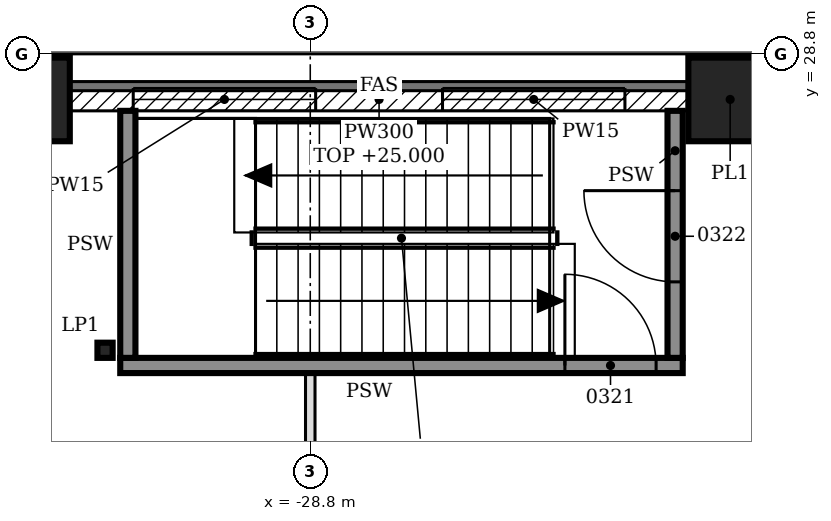
"""IFC4 building model, lengths in metres.
Left out: names, types, materials, properties, quantities, classifications, styles, units other than length and angle.
Written with IfcOpenShell. Run it as: python <this file> out.ifc"""

import sys

from ifc_helpers import new_model, si_unit, direction, frame, frame_2d, origin, origin_2d, place, context, subcontext, project, spatial, polyline, rectangle, hollow_rectangle, i_section, outline, extrude, element, fill, save


model = new_model("IFC4")
c1 = context("Model", 3, precision=1e-05, world=origin(), true_north=direction((0.0, 1.0)))
c2 = subcontext(c1, "Body", "Model", "MODEL_VIEW")
j1 = project(units=[si_unit("LENGTHUNIT", "METRE"), si_unit("PLANEANGLEUNIT", "RADIAN")], contexts=[c1])
p1 = place(None, origin())
s1 = spatial("IfcSite", under=j1, at=p1, CompositionType="ELEMENT")
p2 = place(p1, origin())
s2 = spatial("IfcBuilding", under=s1, at=p2, CompositionType="ELEMENT")
p3 = place(p2, frame((0.0, 0.0, 21.0)))
s3 = spatial("IfcBuildingStorey", under=s2, at=p3, CompositionType="ELEMENT", Elevation=21.0)
for number, where, z_axis, x_axis in (
    (1, (-23.276, 28.2, 0.0), (0.0, 0.0, 1.0), (1.0, 0.0, 0.0)),
    (2, (-32.514, 28.2, 0.0), (0.0, 0.0, 1.0), (1.0, 0.0, 0.0)),
):
    element("IfcColumn", number, at=place(p3, frame(where, z_axis=z_axis, x_axis=x_axis)), inside=s3, PredefinedType="COLUMN", context=c2, shape_type="SweptSolid", body=[
        extrude(hollow_rectangle(XDim=1.1, YDim=1.1, WallThickness=0.06, at=origin_2d()), origin(), (0.0, 0.0, 1.0), 4.8),
    ])
p4 = place(p3, frame((-31.5, 24.9, 0.0), z_axis=(0.0, 0.0, 1.0), x_axis=(1.0, 0.0, 0.0)))
e3 = element("IfcColumn", 3, at=p4, inside=s3, PredefinedType="COLUMN", context=c2, shape_type="SweptSolid", body=[
    extrude(i_section(OverallWidth=0.2, OverallDepth=0.2, WebThickness=0.009, FlangeThickness=0.015, FilletRadius=0.018, at=origin_2d()), origin(), (0.0, 0.0, 1.0), 4.8),
])
p5 = place(p3, frame((-23.826, 28.2, 0.0), z_axis=(0.0, 0.0, 1.0), x_axis=(-1.0, 0.0, 0.0)))
e4 = element("IfcWall", 4, at=p5, inside=s3, PredefinedType="SOLIDWALL", context=c2, shape_type="SweptSolid", body=[
    extrude(rectangle(XDim=8.138, YDim=0.3, at=frame_2d((4.069, 0.0))), origin(), (0.0, 0.0, 1.0), 4.0),
])
p6 = place(p5, frame((0.834, 0.0, 0.9)))
e5 = element("IfcOpeningElement", 5, at=p6, cuts=e4, PredefinedType="OPENING", context=c2, shape_type="SweptSolid", body=[
    extrude(rectangle(XDim=2.4, YDim=1.5, at=frame_2d((1.2, 0.75))), frame((0.0, 0.16, 0.0), z_axis=(0.0, -1.0, 0.0), x_axis=(1.0, 0.0, 0.0)), (0.0, 0.0, 1.0), 0.32),
])
p7 = place(p5, frame((4.903, 0.0, 0.9)))
e6 = element("IfcOpeningElement", 6, at=p7, cuts=e4, PredefinedType="OPENING", context=c2, shape_type="SweptSolid", body=[
    extrude(rectangle(XDim=2.4, YDim=1.5, at=frame_2d((1.2, 0.75))), frame((0.0, 0.16, 0.0), z_axis=(0.0, -1.0, 0.0), x_axis=(1.0, 0.0, 0.0)), (0.0, 0.0, 1.0), 0.32),
])
p8 = place(p3, frame((-28.8, -24.6, 0.0), z_axis=(0.0, 0.0, 1.0), x_axis=(0.0, 1.0, 0.0)))
e7 = element("IfcWall", 7, at=p8, inside=s3, PredefinedType="PARTITIONING", context=c2, shape_type="SweptSolid", body=[
    extrude(outline(polyline([(0.0, 0.0), (49.2, 0.0), (49.2, 4.6), (43.95, 4.6), (43.948, 3.98), (43.65, 3.98), (43.648, 4.6), (39.15, 4.6), (39.148, 3.98), (38.85, 3.98), (38.848, 4.6), (34.35, 4.6), (34.348, 3.98), (34.05, 3.98), (34.048, 4.6), (29.55, 4.6), (29.548, 3.98), (29.25, 3.98), (29.248, 4.6), (24.75, 4.6), (24.748, 3.98), (24.45, 3.98), (24.448, 4.6), (19.95, 4.6), (19.948, 3.98), (19.65, 3.98), (19.648, 4.6), (15.15, 4.6), (15.148, 3.98), (14.85, 3.98), (14.848, 4.6), (10.35, 4.6), (10.348, 3.98), (10.05, 3.98), (10.048, 4.6), (5.55, 4.6), (5.548, 3.98), (5.25, 3.98), (5.248, 4.6), (0.0, 4.6), (0.0, 0.0)])), frame((0.0, 0.062, 0.0), z_axis=(0.0, -1.0, 0.0), x_axis=(1.0, 0.0, 0.0)), (0.0, 0.0, 1.0), 0.125),
])
p9 = place(p8, frame((1.7, 0.0, 0.0)))
e8 = element("IfcOpeningElement", 8, at=p9, cuts=e7, PredefinedType="OPENING", context=c2, shape_type="SweptSolid", body=[
    extrude(rectangle(XDim=1.8, YDim=2.1, at=frame_2d((0.9, 1.05))), frame((0.0, 0.073, 0.0), z_axis=(0.0, -1.0, 0.0), x_axis=(1.0, 0.0, 0.0)), (0.0, 0.0, 1.0), 0.145),
])
p10 = place(p8, frame((8.05, 0.0, 0.0)))
e9 = element("IfcOpeningElement", 9, at=p10, cuts=e7, PredefinedType="OPENING", context=c2, shape_type="SweptSolid", body=[
    extrude(rectangle(XDim=1.8, YDim=2.1, at=frame_2d((0.9, 1.05))), frame((0.0, 0.073, 0.0), z_axis=(0.0, -1.0, 0.0), x_axis=(1.0, 0.0, 0.0)), (0.0, 0.0, 1.0), 0.145),
])
p11 = place(p8, frame((14.7, 0.0, 0.0)))
e10 = element("IfcOpeningElement", 10, at=p11, cuts=e7, PredefinedType="OPENING", context=c2, shape_type="SweptSolid", body=[
    extrude(rectangle(XDim=1.8, YDim=2.1, at=frame_2d((0.9, 1.05))), frame((0.0, 0.073, 0.0), z_axis=(0.0, -1.0, 0.0), x_axis=(1.0, 0.0, 0.0)), (0.0, 0.0, 1.0), 0.145),
])
p12 = place(p8, frame((21.2, 0.0, 0.0)))
e11 = element("IfcOpeningElement", 11, at=p12, cuts=e7, PredefinedType="OPENING", context=c2, shape_type="SweptSolid", body=[
    extrude(rectangle(XDim=1.8, YDim=2.1, at=frame_2d((0.9, 1.05))), frame((0.0, 0.073, 0.0), z_axis=(0.0, -1.0, 0.0), x_axis=(1.0, 0.0, 0.0)), (0.0, 0.0, 1.0), 0.145),
])
p13 = place(p8, frame((26.2, 0.0, 0.0)))
e12 = element("IfcOpeningElement", 12, at=p13, cuts=e7, PredefinedType="OPENING", context=c2, shape_type="SweptSolid", body=[
    extrude(rectangle(XDim=1.8, YDim=2.1, at=frame_2d((0.9, 1.05))), frame((0.0, 0.073, 0.0), z_axis=(0.0, -1.0, 0.0), x_axis=(1.0, 0.0, 0.0)), (0.0, 0.0, 1.0), 0.145),
])
p14 = place(p8, frame((32.7, 0.0, 0.0)))
e13 = element("IfcOpeningElement", 13, at=p14, cuts=e7, PredefinedType="OPENING", context=c2, shape_type="SweptSolid", body=[
    extrude(rectangle(XDim=1.8, YDim=2.1, at=frame_2d((0.9, 1.05))), frame((0.0, 0.073, 0.0), z_axis=(0.0, -1.0, 0.0), x_axis=(1.0, 0.0, 0.0)), (0.0, 0.0, 1.0), 0.145),
])
p15 = place(p8, frame((39.35, 0.0, 0.0)))
e14 = element("IfcOpeningElement", 14, at=p15, cuts=e7, PredefinedType="OPENING", context=c2, shape_type="SweptSolid", body=[
    extrude(rectangle(XDim=1.8, YDim=2.1, at=frame_2d((0.9, 1.05))), frame((0.0, 0.073, 0.0), z_axis=(0.0, -1.0, 0.0), x_axis=(1.0, 0.0, 0.0)), (0.0, 0.0, 1.0), 0.145),
])
p16 = place(p8, frame((45.7, 0.0, 0.0)))
e15 = element("IfcOpeningElement", 15, at=p16, cuts=e7, PredefinedType="OPENING", context=c2, shape_type="SweptSolid", body=[
    extrude(rectangle(XDim=1.8, YDim=2.1, at=frame_2d((0.9, 1.05))), frame((0.0, 0.073, 0.0), z_axis=(0.0, -1.0, 0.0), x_axis=(1.0, 0.0, 0.0)), (0.0, 0.0, 1.0), 0.145),
])
p17 = place(p3, frame((-31.3, 24.7, 0.0), z_axis=(0.0, 0.0, 1.0), x_axis=(1.0, 0.0, 0.0)))
e16 = element("IfcWall", 16, at=p17, inside=s3, PredefinedType="SOLIDWALL", context=c2, shape_type="SweptSolid", body=[
    extrude(rectangle(XDim=7.4, YDim=0.2, at=frame_2d((3.7, 0.0))), origin(), (0.0, 0.0, 1.0), 4.6),
])
p18 = place(p17, frame((5.85, 0.0, 0.0)))
e17 = element("IfcOpeningElement", 17, at=p18, cuts=e16, PredefinedType="OPENING", context=c2, shape_type="SweptSolid", body=[
    extrude(rectangle(XDim=1.2, YDim=2.1, at=frame_2d((0.6, 1.05))), frame((0.0, 0.11, 0.0), z_axis=(0.0, -1.0, 0.0), x_axis=(1.0, 0.0, 0.0)), (0.0, 0.0, 1.0), 0.22),
])
p19 = place(p3, frame((-31.2, 24.8, 0.0), z_axis=(0.0, 0.0, 1.0), x_axis=(0.0, 1.0, 0.0)))
e18 = element("IfcWall", 18, at=p19, inside=s3, PredefinedType="SOLIDWALL", context=c2, shape_type="SweptSolid", body=[
    extrude(rectangle(XDim=3.25, YDim=0.2, at=frame_2d((1.625, 0.0))), origin(), (0.0, 0.0, 1.0), 4.6),
])
p20 = place(p3, frame((-24.0, 24.8, 0.0), z_axis=(0.0, 0.0, 1.0), x_axis=(0.0, 1.0, 0.0)))
e19 = element("IfcWall", 19, at=p20, inside=s3, PredefinedType="SOLIDWALL", context=c2, shape_type="SweptSolid", body=[
    extrude(rectangle(XDim=3.25, YDim=0.2, at=frame_2d((1.625, 0.0))), origin(), (0.0, 0.0, 1.0), 4.6),
])
p21 = place(p20, frame((1.0, 0.0, 0.0)))
e20 = element("IfcOpeningElement", 20, at=p21, cuts=e19, PredefinedType="OPENING", context=c2, shape_type="SweptSolid", body=[
    extrude(rectangle(XDim=1.2, YDim=2.1, at=frame_2d((0.6, 1.05))), frame((0.0, 0.11, 0.0), z_axis=(0.0, -1.0, 0.0), x_axis=(1.0, 0.0, 0.0)), (0.0, 0.0, 1.0), 0.22),
])
p22 = place(p6, origin())
e21 = element("IfcWindow", 21, at=p22, inside=s3, PartitioningType="SINGLE_PANEL", PredefinedType="WINDOW", context=c2, shape_type="SweptSolid", body=[
    extrude(rectangle(XDim=2.4, YDim=1.5, at=frame_2d((1.2, 0.75))), frame((0.0, 0.03, 0.0), z_axis=(0.0, -1.0, 0.0), x_axis=(1.0, 0.0, 0.0)), (0.0, 0.0, 1.0), 0.06),
])
fill(e5, e21)
p23 = place(p7, origin())
e22 = element("IfcWindow", 22, at=p23, inside=s3, PartitioningType="SINGLE_PANEL", PredefinedType="WINDOW", context=c2, shape_type="SweptSolid", body=[
    extrude(rectangle(XDim=2.4, YDim=1.5, at=frame_2d((1.2, 0.75))), frame((0.0, 0.03, 0.0), z_axis=(0.0, -1.0, 0.0), x_axis=(1.0, 0.0, 0.0)), (0.0, 0.0, 1.0), 0.06),
])
fill(e6, e22)
p24 = place(p18, origin())
e23 = element("IfcDoor", 23, at=p24, inside=s3, OperationType="SINGLE_SWING_LEFT", PredefinedType="DOOR", context=c2, shape_type="SweptSolid", body=[
    extrude(rectangle(XDim=1.2, YDim=2.1, at=frame_2d((0.6, 1.05))), frame((0.0, 0.025, 0.0), z_axis=(0.0, -1.0, 0.0), x_axis=(1.0, 0.0, 0.0)), (0.0, 0.0, 1.0), 0.05),
])
fill(e17, e23)
p25 = place(p21, origin())
e24 = element("IfcDoor", 24, at=p25, inside=s3, OperationType="SINGLE_SWING_RIGHT", PredefinedType="DOOR", context=c2, shape_type="SweptSolid", body=[
    extrude(rectangle(XDim=1.2, YDim=2.1, at=frame_2d((0.6, 1.05))), frame((0.0, 0.025, 0.0), z_axis=(0.0, -1.0, 0.0), x_axis=(1.0, 0.0, 0.0)), (0.0, 0.0, 1.0), 0.05),
])
fill(e20, e24)
save(model, sys.argv[1])
